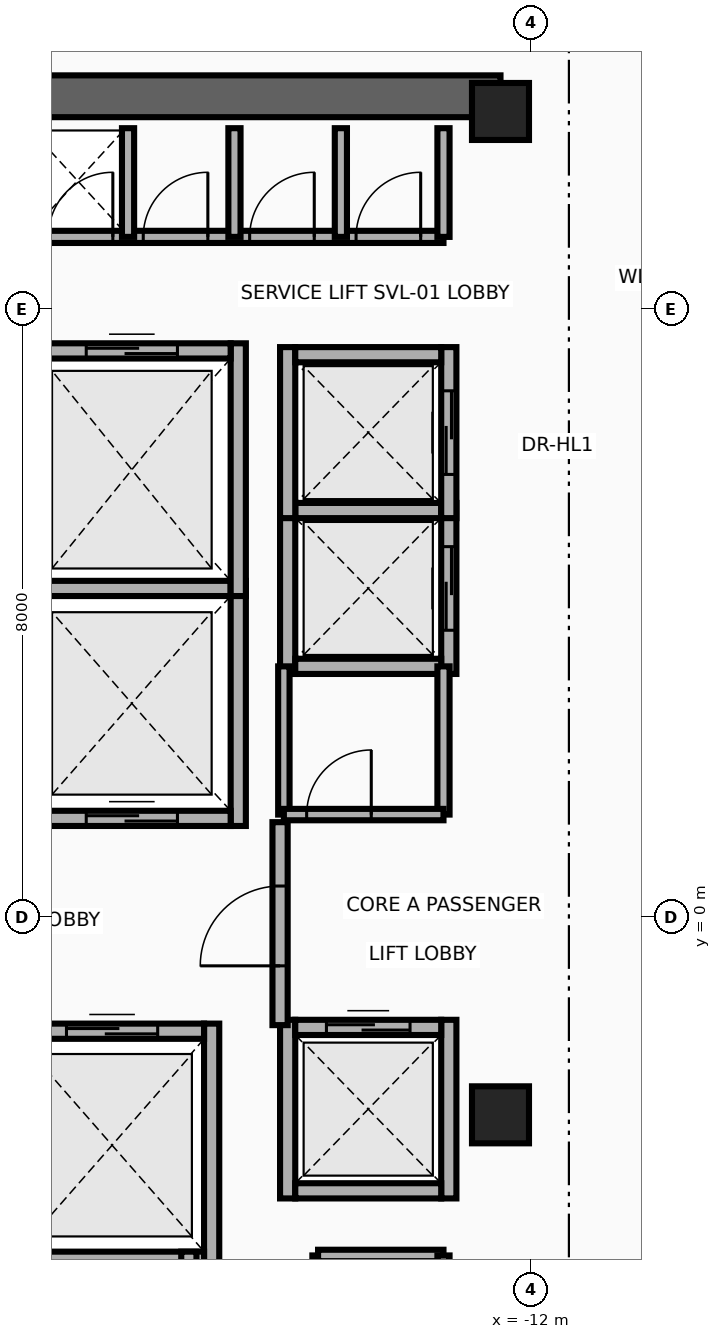
"""IFC4 building model, lengths in metres.
Left out: names, types, materials, properties, quantities, classifications, styles, units other than length and angle.
Written with IfcOpenShell. Run it as: python <this file> out.ifc"""

import sys

from ifc_helpers import new_model, si_unit, direction, frame, frame_2d, origin, origin_2d, place, context, subcontext, project, spatial, rectangle, extrude, source, transform, mapped, element, fill, save


model = new_model("IFC4")
c1 = context("Model", 3, precision=1e-05, world=origin(), true_north=direction((0.0, 1.0)))
c2 = subcontext(c1, "Body", "Model", "MODEL_VIEW")
j1 = project(units=[si_unit("LENGTHUNIT", "METRE"), si_unit("PLANEANGLEUNIT", "RADIAN")], contexts=[c1])
p1 = place(None, origin())
s1 = spatial("IfcSite", under=j1, at=p1, CompositionType="ELEMENT")
p2 = place(p1, origin())
s2 = spatial("IfcBuilding", under=s1, at=p2, CompositionType="ELEMENT")
p3 = place(p2, frame((0.0, 0.0, 287.0)))
s3 = spatial("IfcBuildingStorey", under=s2, at=p3, CompositionType="ELEMENT", Elevation=287.0)
p4 = place(p3, frame((-22.65, 10.8, 0.0), z_axis=(0.0, 0.0, 1.0), x_axis=(1.0, 0.0, 0.0)))
e1 = element("IfcWall", 1, at=p4, inside=s3, PredefinedType="SHEAR", context=c2, shape_type="SweptSolid", body=[
    extrude(rectangle(XDim=10.25, YDim=0.55, at=frame_2d((5.125, 0.0))), origin(), (0.0, 0.0, 1.0), 3.36),
])
m1 = source(origin(), c2, "Body", "SweptSolid", [
    extrude(rectangle(XDim=0.75, YDim=0.75, at=origin_2d()), origin(), (0.0, 0.0, 1.0), 3.6),
])
for number, where, z_axis, x_axis in (
    (2, (-12.4, -2.6, 0.0), (0.0, 0.0, 1.0), (1.0, 0.0, 0.0)),
    (3, (-12.4, 10.6, 0.0), (0.0, 0.0, 1.0), (1.0, 0.0, 0.0)),
):
    element("IfcColumn", number, at=place(p3, frame(where, z_axis=z_axis, x_axis=x_axis)), inside=s3, PredefinedType="COLUMN", context=c2, shape_type="MappedRepresentation", body=[
        mapped(m1, transform((0.0, 0.0, 0.0), x_axis=(1.0, 0.0, 0.0), y_axis=(0.0, 1.0, 0.0), z_axis=(0.0, 0.0, 1.0), scale=1.0)),
    ])
p5 = place(p3, frame((-15.85, 1.2, 0.0), z_axis=(0.0, 0.0, 1.0), x_axis=(0.0, 1.0, 0.0)))
e4 = element("IfcWall", 4, at=p5, inside=s3, PredefinedType="MOVABLE", context=c2, shape_type="SweptSolid", body=[
    extrude(rectangle(XDim=3.225, YDim=0.2, at=frame_2d((1.613, 0.0))), origin(), (0.0, 0.0, 1.0), 3.36),
])
p6 = place(p3, frame((-18.55, 1.3, 0.0), z_axis=(0.0, 0.0, 1.0), x_axis=(1.0, 0.0, 0.0)))
e5 = element("IfcWall", 5, at=p6, inside=s3, PredefinedType="MOVABLE", context=c2, shape_type="SweptSolid", body=[
    extrude(rectangle(XDim=2.6, YDim=0.2, at=frame_2d((1.3, 0.0))), origin(), (0.0, 0.0, 1.0), 3.36),
])
p7 = place(p6, frame((0.7, 0.0, 0.0)))
e6 = element("IfcOpeningElement", 6, at=p7, cuts=e5, PredefinedType="OPENING", context=c2, shape_type="SweptSolid", body=[
    extrude(rectangle(XDim=1.2, YDim=2.1, at=frame_2d((0.6, 1.05))), frame((0.0, 0.115, 0.0), z_axis=(0.0, -1.0, 0.0), x_axis=(1.0, 0.0, 0.0)), (0.0, 0.0, 1.0), 0.23),
])
p8 = place(p3, frame((-18.55, 4.325, 0.0), z_axis=(0.0, 0.0, 1.0), x_axis=(1.0, 0.0, 0.0)))
e7 = element("IfcWall", 7, at=p8, inside=s3, PredefinedType="MOVABLE", context=c2, shape_type="SweptSolid", body=[
    extrude(rectangle(XDim=2.6, YDim=0.2, at=frame_2d((1.3, 0.0))), origin(), (0.0, 0.0, 1.0), 3.36),
])
p9 = place(p3, frame((-16.2, -4.6, 0.0), z_axis=(0.0, 0.0, 1.0), x_axis=(0.0, 1.0, 0.0)))
e8 = element("IfcWall", 8, at=p9, inside=s3, PredefinedType="MOVABLE", context=c2, shape_type="SweptSolid", body=[
    extrude(rectangle(XDim=3.2, YDim=0.2, at=frame_2d((1.6, 0.0))), origin(), (0.0, 0.0, 1.0), 3.36),
])
p10 = place(p3, frame((-18.72, -4.5, 0.0), z_axis=(0.0, 0.0, 1.0), x_axis=(1.0, 0.0, 0.0)))
e9 = element("IfcWall", 9, at=p10, inside=s3, PredefinedType="MOVABLE", context=c2, shape_type="SweptSolid", body=[
    extrude(rectangle(XDim=2.42, YDim=0.2, at=frame_2d((1.21, 0.0))), origin(), (0.0, 0.0, 1.0), 3.36),
])
p11 = place(p3, frame((-18.72, -1.5, 0.0), z_axis=(0.0, 0.0, 1.0), x_axis=(1.0, 0.0, 0.0)))
e10 = element("IfcWall", 10, at=p11, inside=s3, PredefinedType="MOVABLE", context=c2, shape_type="SweptSolid", body=[
    extrude(rectangle(XDim=2.42, YDim=0.2, at=frame_2d((1.21, 0.0))), origin(), (0.0, 0.0, 1.0), 3.36),
])
p12 = place(p11, frame((0.61, 0.0, 0.0)))
e11 = element("IfcOpeningElement", 11, at=p12, cuts=e10, PredefinedType="OPENING", context=c2, shape_type="SweptSolid", body=[
    extrude(rectangle(XDim=1.2, YDim=2.1, at=frame_2d((0.6, 1.05))), frame((0.0, 0.115, 0.0), z_axis=(0.0, -1.0, 0.0), x_axis=(1.0, 0.0, 0.0)), (0.0, 0.0, 1.0), 0.23),
])
p13 = place(p3, frame((-15.85, 4.225, 0.0), z_axis=(0.0, 0.0, 1.0), x_axis=(0.0, 1.0, 0.0)))
e12 = element("IfcWall", 12, at=p13, inside=s3, PredefinedType="MOVABLE", context=c2, shape_type="SweptSolid", body=[
    extrude(rectangle(XDim=3.325, YDim=0.2, at=frame_2d((1.663, 0.0))), origin(), (0.0, 0.0, 1.0), 3.36),
])
p14 = place(p3, frame((-18.55, 7.45, 0.0), z_axis=(0.0, 0.0, 1.0), x_axis=(1.0, 0.0, 0.0)))
e13 = element("IfcWall", 13, at=p14, inside=s3, PredefinedType="MOVABLE", context=c2, shape_type="SweptSolid", body=[
    extrude(rectangle(XDim=2.6, YDim=0.2, at=frame_2d((1.3, 0.0))), origin(), (0.0, 0.0, 1.0), 3.36),
])
p15 = place(p14, frame((0.7, 0.0, 0.0)))
e14 = element("IfcOpeningElement", 14, at=p15, cuts=e13, PredefinedType="OPENING", context=c2, shape_type="SweptSolid", body=[
    extrude(rectangle(XDim=1.2, YDim=2.1, at=frame_2d((0.6, 1.05))), frame((0.0, 0.115, 0.0), z_axis=(0.0, -1.0, 0.0), x_axis=(1.0, 0.0, 0.0)), (0.0, 0.0, 1.0), 0.23),
])
p16 = place(p3, frame((-15.2, 3.2, 0.0), z_axis=(0.0, 0.0, 1.0), x_axis=(0.0, 1.0, 0.0)))
e15 = element("IfcWall", 15, at=p16, inside=s3, PredefinedType="MOVABLE", context=c2, shape_type="SweptSolid", body=[
    extrude(rectangle(XDim=2.25, YDim=0.2, at=frame_2d((1.125, 0.0))), origin(), (0.0, 0.0, 1.0), 3.36),
])
p17 = place(p3, frame((-13.08, 3.2, 0.0), z_axis=(0.0, 0.0, 1.0), x_axis=(0.0, 1.0, 0.0)))
e16 = element("IfcWall", 16, at=p17, inside=s3, PredefinedType="MOVABLE", context=c2, shape_type="SweptSolid", body=[
    extrude(rectangle(XDim=2.25, YDim=0.2, at=frame_2d((1.125, 0.0))), origin(), (0.0, 0.0, 1.0), 3.36),
])
p18 = place(p17, frame((0.575, 0.0, 0.0)))
e17 = element("IfcOpeningElement", 17, at=p18, cuts=e16, PredefinedType="OPENING", context=c2, shape_type="SweptSolid", body=[
    extrude(rectangle(XDim=1.1, YDim=2.1, at=frame_2d((0.55, 1.05))), frame((0.0, 0.115, 0.0), z_axis=(0.0, -1.0, 0.0), x_axis=(1.0, 0.0, 0.0)), (0.0, 0.0, 1.0), 0.23),
])
for number, where, z_axis, x_axis in (
    (18, (-15.1, 3.3, 0.0), (0.0, 0.0, 1.0), (1.0, 0.0, 0.0)),
    (19, (-15.1, 5.35, 0.0), (0.0, 0.0, 1.0), (1.0, 0.0, 0.0)),
):
    element("IfcWall", number, at=place(p3, frame(where, z_axis=z_axis, x_axis=x_axis)), inside=s3, PredefinedType="MOVABLE", context=c2, shape_type="SweptSolid", body=[
        extrude(rectangle(XDim=1.92, YDim=0.2, at=frame_2d((0.96, 0.0))), origin(), (0.0, 0.0, 1.0), 3.36),
    ])
p19 = place(p3, frame((-15.2, 5.25, 0.0), z_axis=(0.0, 0.0, 1.0), x_axis=(0.0, 1.0, 0.0)))
e20 = element("IfcWall", 20, at=p19, inside=s3, PredefinedType="MOVABLE", context=c2, shape_type="SweptSolid", body=[
    extrude(rectangle(XDim=2.25, YDim=0.2, at=frame_2d((1.125, 0.0))), origin(), (0.0, 0.0, 1.0), 3.36),
])
p20 = place(p3, frame((-13.08, 5.25, 0.0), z_axis=(0.0, 0.0, 1.0), x_axis=(0.0, 1.0, 0.0)))
e21 = element("IfcWall", 21, at=p20, inside=s3, PredefinedType="MOVABLE", context=c2, shape_type="SweptSolid", body=[
    extrude(rectangle(XDim=2.25, YDim=0.2, at=frame_2d((1.125, 0.0))), origin(), (0.0, 0.0, 1.0), 3.36),
])
p21 = place(p20, frame((0.575, 0.0, 0.0)))
e22 = element("IfcOpeningElement", 22, at=p21, cuts=e21, PredefinedType="OPENING", context=c2, shape_type="SweptSolid", body=[
    extrude(rectangle(XDim=1.1, YDim=2.1, at=frame_2d((0.55, 1.05))), frame((0.0, 0.115, 0.0), z_axis=(0.0, -1.0, 0.0), x_axis=(1.0, 0.0, 0.0)), (0.0, 0.0, 1.0), 0.23),
])
p22 = place(p3, frame((-15.1, 7.4, 0.0), z_axis=(0.0, 0.0, 1.0), x_axis=(1.0, 0.0, 0.0)))
e23 = element("IfcWall", 23, at=p22, inside=s3, PredefinedType="MOVABLE", context=c2, shape_type="SweptSolid", body=[
    extrude(rectangle(XDim=1.92, YDim=0.2, at=frame_2d((0.96, 0.0))), origin(), (0.0, 0.0, 1.0), 3.36),
])
p23 = place(p3, frame((-16.5, -6.7, 0.0), z_axis=(0.0, 0.0, 1.0), x_axis=(0.0, 1.0, 0.0)))
e24 = element("IfcWall", 24, at=p23, inside=s3, PredefinedType="MOVABLE", context=c2, shape_type="SweptSolid", body=[
    extrude(rectangle(XDim=2.3, YDim=0.2, at=frame_2d((1.15, 0.0))), origin(), (0.0, 0.0, 1.0), 3.36),
])
for number, where, z_axis, x_axis in (
    (25, (-15.2, -3.7, 0.0), (0.0, 0.0, 1.0), (0.0, 1.0, 0.0)),
    (26, (-13.08, -3.7, 0.0), (0.0, 0.0, 1.0), (0.0, 1.0, 0.0)),
):
    element("IfcWall", number, at=place(p3, frame(where, z_axis=z_axis, x_axis=x_axis)), inside=s3, PredefinedType="MOVABLE", context=c2, shape_type="SweptSolid", body=[
        extrude(rectangle(XDim=2.35, YDim=0.2, at=frame_2d((1.175, 0.0))), origin(), (0.0, 0.0, 1.0), 3.36),
    ])
p24 = place(p3, frame((-15.1, -3.6, 0.0), z_axis=(0.0, 0.0, 1.0), x_axis=(1.0, 0.0, 0.0)))
e27 = element("IfcWall", 27, at=p24, inside=s3, PredefinedType="MOVABLE", context=c2, shape_type="SweptSolid", body=[
    extrude(rectangle(XDim=1.92, YDim=0.2, at=frame_2d((0.96, 0.0))), origin(), (0.0, 0.0, 1.0), 3.36),
])
p25 = place(p3, frame((-15.1, -1.45, 0.0), z_axis=(0.0, 0.0, 1.0), x_axis=(1.0, 0.0, 0.0)))
e28 = element("IfcWall", 28, at=p25, inside=s3, PredefinedType="MOVABLE", context=c2, shape_type="SweptSolid", body=[
    extrude(rectangle(XDim=1.92, YDim=0.2, at=frame_2d((0.96, 0.0))), origin(), (0.0, 0.0, 1.0), 3.36),
])
p26 = place(p25, frame((0.41, 0.0, 0.0)))
e29 = element("IfcOpeningElement", 29, at=p26, cuts=e28, PredefinedType="OPENING", context=c2, shape_type="SweptSolid", body=[
    extrude(rectangle(XDim=1.1, YDim=2.1, at=frame_2d((0.55, 1.05))), frame((0.0, 0.115, 0.0), z_axis=(0.0, -1.0, 0.0), x_axis=(1.0, 0.0, 0.0)), (0.0, 0.0, 1.0), 0.23),
])
p27 = place(p3, frame((-15.3, -1.42, 0.0), z_axis=(0.0, 0.0, 1.0), x_axis=(0.0, 1.0, 0.0)))
e30 = element("IfcWall", 30, at=p27, inside=s3, PredefinedType="PARTITIONING", context=c2, shape_type="SweptSolid", body=[
    extrude(rectangle(XDim=2.67, YDim=0.2, at=frame_2d((1.335, 0.0))), origin(), (0.0, 0.0, 1.0), 3.36),
])
p28 = place(p27, frame((0.78, 0.0, 0.0)))
e31 = element("IfcOpeningElement", 31, at=p28, cuts=e30, PredefinedType="OPENING", context=c2, shape_type="SweptSolid", body=[
    extrude(rectangle(XDim=1.05, YDim=2.15, at=frame_2d((0.525, 1.075))), frame((0.0, 0.115, 0.0), z_axis=(0.0, -1.0, 0.0), x_axis=(1.0, 0.0, 0.0)), (0.0, 0.0, 1.0), 0.23),
])
p29 = place(p3, frame((-18.65, 8.95, 0.0), z_axis=(0.0, 0.0, 1.0), x_axis=(1.0, 0.0, 0.0)))
e32 = element("IfcWall", 32, at=p29, inside=s3, PredefinedType="PARTITIONING", context=c2, shape_type="SweptSolid", body=[
    extrude(rectangle(XDim=5.5, YDim=0.16, at=frame_2d((2.75, 0.0))), origin(), (0.0, 0.0, 1.0), 3.36),
])
p30 = place(p29, frame((0.3, 0.0, 0.0)))
e33 = element("IfcOpeningElement", 33, at=p30, cuts=e32, PredefinedType="OPENING", context=c2, shape_type="SweptSolid", body=[
    extrude(rectangle(XDim=0.85, YDim=2.05, at=frame_2d((0.425, 1.025))), frame((0.0, 0.095, 0.0), z_axis=(0.0, -1.0, 0.0), x_axis=(1.0, 0.0, 0.0)), (0.0, 0.0, 1.0), 0.19),
])
p31 = place(p29, frame((1.55, 0.0, 0.0)))
e34 = element("IfcOpeningElement", 34, at=p31, cuts=e32, PredefinedType="OPENING", context=c2, shape_type="SweptSolid", body=[
    extrude(rectangle(XDim=0.85, YDim=2.05, at=frame_2d((0.425, 1.025))), frame((0.0, 0.095, 0.0), z_axis=(0.0, -1.0, 0.0), x_axis=(1.0, 0.0, 0.0)), (0.0, 0.0, 1.0), 0.19),
])
p32 = place(p29, frame((2.95, 0.0, 0.0)))
e35 = element("IfcOpeningElement", 35, at=p32, cuts=e32, PredefinedType="OPENING", context=c2, shape_type="SweptSolid", body=[
    extrude(rectangle(XDim=0.85, YDim=2.05, at=frame_2d((0.425, 1.025))), frame((0.0, 0.095, 0.0), z_axis=(0.0, -1.0, 0.0), x_axis=(1.0, 0.0, 0.0)), (0.0, 0.0, 1.0), 0.19),
])
p33 = place(p29, frame((4.35, 0.0, 0.0)))
e36 = element("IfcOpeningElement", 36, at=p33, cuts=e32, PredefinedType="OPENING", context=c2, shape_type="SweptSolid", body=[
    extrude(rectangle(XDim=0.85, YDim=2.05, at=frame_2d((0.425, 1.025))), frame((0.0, 0.095, 0.0), z_axis=(0.0, -1.0, 0.0), x_axis=(1.0, 0.0, 0.0)), (0.0, 0.0, 1.0), 0.19),
])
for number, where, z_axis, x_axis in (
    (37, (-13.15, 8.95, 0.0), (0.0, 0.0, 1.0), (0.0, 1.0, 0.0)),
    (38, (-17.3, 8.95, 0.0), (0.0, 0.0, 1.0), (0.0, 1.0, 0.0)),
    (39, (-15.9, 8.95, 0.0), (0.0, 0.0, 1.0), (0.0, 1.0, 0.0)),
    (40, (-14.5, 8.95, 0.0), (0.0, 0.0, 1.0), (0.0, 1.0, 0.0)),
):
    element("IfcWall", number, at=place(p3, frame(where, z_axis=z_axis, x_axis=x_axis)), inside=s3, PredefinedType="PARTITIONING", context=c2, shape_type="SweptSolid", body=[
        extrude(rectangle(XDim=1.43, YDim=0.16, at=frame_2d((0.715, 0.0))), origin(), (0.0, 0.0, 1.0), 3.36),
    ])
p34 = place(p3, frame((-14.8, -6.58, 0.0), z_axis=(0.0, 0.0, 1.0), x_axis=(0.0, 1.0, 0.0)))
e41 = element("IfcWall", 41, at=p34, inside=s3, PredefinedType="PARTITIONING", context=c2, shape_type="SweptSolid", body=[
    extrude(rectangle(XDim=2.13, YDim=0.15, at=frame_2d((1.065, 0.0))), origin(), (0.0, 0.0, 1.0), 3.36),
])
p35 = place(p3, frame((-14.8, -4.45, 0.0), z_axis=(0.0, 0.0, 1.0), x_axis=(1.0, 0.0, 0.0)))
e42 = element("IfcWall", 42, at=p35, inside=s3, PredefinedType="PARTITIONING", context=c2, shape_type="SweptSolid", body=[
    extrude(rectangle(XDim=1.65, YDim=0.15, at=frame_2d((0.825, 0.0))), origin(), (0.0, 0.0, 1.0), 3.36),
])
p36 = place(p3, frame((-13.15, -6.58, 0.0), z_axis=(0.0, 0.0, 1.0), x_axis=(0.0, 1.0, 0.0)))
e43 = element("IfcWall", 43, at=p36, inside=s3, PredefinedType="PARTITIONING", context=c2, shape_type="SweptSolid", body=[
    extrude(rectangle(XDim=2.13, YDim=0.16, at=frame_2d((1.065, 0.0))), origin(), (0.0, 0.0, 1.0), 3.36),
])
p37 = place(p3, frame((-13.15, 1.35, 0.0), z_axis=(0.0, 0.0, 1.0), x_axis=(0.0, 1.0, 0.0)))
e44 = element("IfcWall", 44, at=p37, inside=s3, PredefinedType="PARTITIONING", context=c2, shape_type="SweptSolid", body=[
    extrude(rectangle(XDim=1.95, YDim=0.16, at=frame_2d((0.975, 0.0))), origin(), (0.0, 0.0, 1.0), 3.36),
])
p38 = place(p3, frame((-15.25, 1.35, 0.0), z_axis=(0.0, 0.0, 1.0), x_axis=(0.0, 1.0, 0.0)))
e45 = element("IfcWall", 45, at=p38, inside=s3, PredefinedType="PARTITIONING", context=c2, shape_type="SweptSolid", body=[
    extrude(rectangle(XDim=1.95, YDim=0.15, at=frame_2d((0.975, 0.0))), origin(), (0.0, 0.0, 1.0), 3.36),
])
p39 = place(p3, frame((-15.25, 1.35, 0.0), z_axis=(0.0, 0.0, 1.0), x_axis=(1.0, 0.0, 0.0)))
e46 = element("IfcWall", 46, at=p39, inside=s3, PredefinedType="PARTITIONING", context=c2, shape_type="SweptSolid", body=[
    extrude(rectangle(XDim=2.1, YDim=0.15, at=frame_2d((1.05, 0.0))), origin(), (0.0, 0.0, 1.0), 3.36),
])
p40 = place(p39, frame((0.3, 0.0, 0.0)))
e47 = element("IfcOpeningElement", 47, at=p40, cuts=e46, PredefinedType="OPENING", context=c2, shape_type="SweptSolid", body=[
    extrude(rectangle(XDim=0.85, YDim=2.05, at=frame_2d((0.425, 1.025))), frame((0.0, 0.09, 0.0), z_axis=(0.0, -1.0, 0.0), x_axis=(1.0, 0.0, 0.0)), (0.0, 0.0, 1.0), 0.18),
])
p41 = place(p7, origin())
e48 = element("IfcDoor", 48, at=p41, inside=s3, OperationType="DOUBLE_DOOR_SLIDING", PredefinedType="DOOR", context=c2, shape_type="SweptSolid", body=[
    extrude(rectangle(XDim=1.2, YDim=2.1, at=frame_2d((0.6, 1.05))), frame((0.0, 0.025, 0.0), z_axis=(0.0, -1.0, 0.0), x_axis=(1.0, 0.0, 0.0)), (0.0, 0.0, 1.0), 0.05),
])
fill(e6, e48)
p42 = place(p12, origin())
e49 = element("IfcDoor", 49, at=p42, inside=s3, OperationType="DOUBLE_DOOR_SLIDING", PredefinedType="DOOR", context=c2, shape_type="SweptSolid", body=[
    extrude(rectangle(XDim=1.2, YDim=2.1, at=frame_2d((0.6, 1.05))), frame((0.0, 0.025, 0.0), z_axis=(0.0, -1.0, 0.0), x_axis=(1.0, 0.0, 0.0)), (0.0, 0.0, 1.0), 0.05),
])
fill(e11, e49)
p43 = place(p15, origin())
e50 = element("IfcDoor", 50, at=p43, inside=s3, OperationType="DOUBLE_DOOR_SLIDING", PredefinedType="DOOR", context=c2, shape_type="SweptSolid", body=[
    extrude(rectangle(XDim=1.2, YDim=2.1, at=frame_2d((0.6, 1.05))), frame((0.0, 0.025, 0.0), z_axis=(0.0, -1.0, 0.0), x_axis=(1.0, 0.0, 0.0)), (0.0, 0.0, 1.0), 0.05),
])
fill(e14, e50)
p44 = place(p18, origin())
e51 = element("IfcDoor", 51, at=p44, inside=s3, OperationType="DOUBLE_DOOR_SLIDING", PredefinedType="DOOR", context=c2, shape_type="SweptSolid", body=[
    extrude(rectangle(XDim=1.1, YDim=2.1, at=frame_2d((0.55, 1.05))), frame((0.0, 0.025, 0.0), z_axis=(0.0, -1.0, 0.0), x_axis=(1.0, 0.0, 0.0)), (0.0, 0.0, 1.0), 0.05),
])
fill(e17, e51)
p45 = place(p21, origin())
e52 = element("IfcDoor", 52, at=p45, inside=s3, OperationType="DOUBLE_DOOR_SLIDING", PredefinedType="DOOR", context=c2, shape_type="SweptSolid", body=[
    extrude(rectangle(XDim=1.1, YDim=2.1, at=frame_2d((0.55, 1.05))), frame((0.0, 0.025, 0.0), z_axis=(0.0, -1.0, 0.0), x_axis=(1.0, 0.0, 0.0)), (0.0, 0.0, 1.0), 0.05),
])
fill(e22, e52)
p46 = place(p26, origin())
e53 = element("IfcDoor", 53, at=p46, inside=s3, OperationType="DOUBLE_DOOR_SLIDING", PredefinedType="DOOR", context=c2, shape_type="SweptSolid", body=[
    extrude(rectangle(XDim=1.1, YDim=2.1, at=frame_2d((0.55, 1.05))), frame((0.0, 0.025, 0.0), z_axis=(0.0, -1.0, 0.0), x_axis=(1.0, 0.0, 0.0)), (0.0, 0.0, 1.0), 0.05),
])
fill(e29, e53)
p47 = place(p28, origin())
e54 = element("IfcDoor", 54, at=p47, inside=s3, OperationType="SINGLE_SWING_RIGHT", PredefinedType="DOOR", context=c2, shape_type="SweptSolid", body=[
    extrude(rectangle(XDim=1.05, YDim=2.15, at=frame_2d((0.525, 1.075))), frame((0.0, 0.025, 0.0), z_axis=(0.0, -1.0, 0.0), x_axis=(1.0, 0.0, 0.0)), (0.0, 0.0, 1.0), 0.05),
])
fill(e31, e54)
p48 = place(p30, origin())
e55 = element("IfcDoor", 55, at=p48, inside=s3, OperationType="SINGLE_SWING_LEFT", PredefinedType="DOOR", context=c2, shape_type="SweptSolid", body=[
    extrude(rectangle(XDim=0.85, YDim=2.05, at=frame_2d((0.425, 1.025))), frame((0.0, 0.025, 0.0), z_axis=(0.0, -1.0, 0.0), x_axis=(1.0, 0.0, 0.0)), (0.0, 0.0, 1.0), 0.05),
])
fill(e33, e55)
p49 = place(p31, origin())
e56 = element("IfcDoor", 56, at=p49, inside=s3, OperationType="SINGLE_SWING_RIGHT", PredefinedType="DOOR", context=c2, shape_type="SweptSolid", body=[
    extrude(rectangle(XDim=0.85, YDim=2.05, at=frame_2d((0.425, 1.025))), frame((0.0, 0.025, 0.0), z_axis=(0.0, -1.0, 0.0), x_axis=(1.0, 0.0, 0.0)), (0.0, 0.0, 1.0), 0.05),
])
fill(e34, e56)
p50 = place(p32, origin())
e57 = element("IfcDoor", 57, at=p50, inside=s3, OperationType="SINGLE_SWING_LEFT", PredefinedType="DOOR", context=c2, shape_type="SweptSolid", body=[
    extrude(rectangle(XDim=0.85, YDim=2.05, at=frame_2d((0.425, 1.025))), frame((0.0, 0.025, 0.0), z_axis=(0.0, -1.0, 0.0), x_axis=(1.0, 0.0, 0.0)), (0.0, 0.0, 1.0), 0.05),
])
fill(e35, e57)
p51 = place(p33, origin())
e58 = element("IfcDoor", 58, at=p51, inside=s3, OperationType="SINGLE_SWING_RIGHT", PredefinedType="DOOR", context=c2, shape_type="SweptSolid", body=[
    extrude(rectangle(XDim=0.85, YDim=2.05, at=frame_2d((0.425, 1.025))), frame((0.0, 0.025, 0.0), z_axis=(0.0, -1.0, 0.0), x_axis=(1.0, 0.0, 0.0)), (0.0, 0.0, 1.0), 0.05),
])
fill(e36, e58)
p52 = place(p40, origin())
e59 = element("IfcDoor", 59, at=p52, inside=s3, OperationType="SINGLE_SWING_RIGHT", PredefinedType="DOOR", context=c2, shape_type="SweptSolid", body=[
    extrude(rectangle(XDim=0.85, YDim=2.05, at=frame_2d((0.425, 1.025))), frame((0.0, 0.025, 0.0), z_axis=(0.0, -1.0, 0.0), x_axis=(1.0, 0.0, 0.0)), (0.0, 0.0, 1.0), 0.05),
])
fill(e47, e59)
save(model, sys.argv[1])
